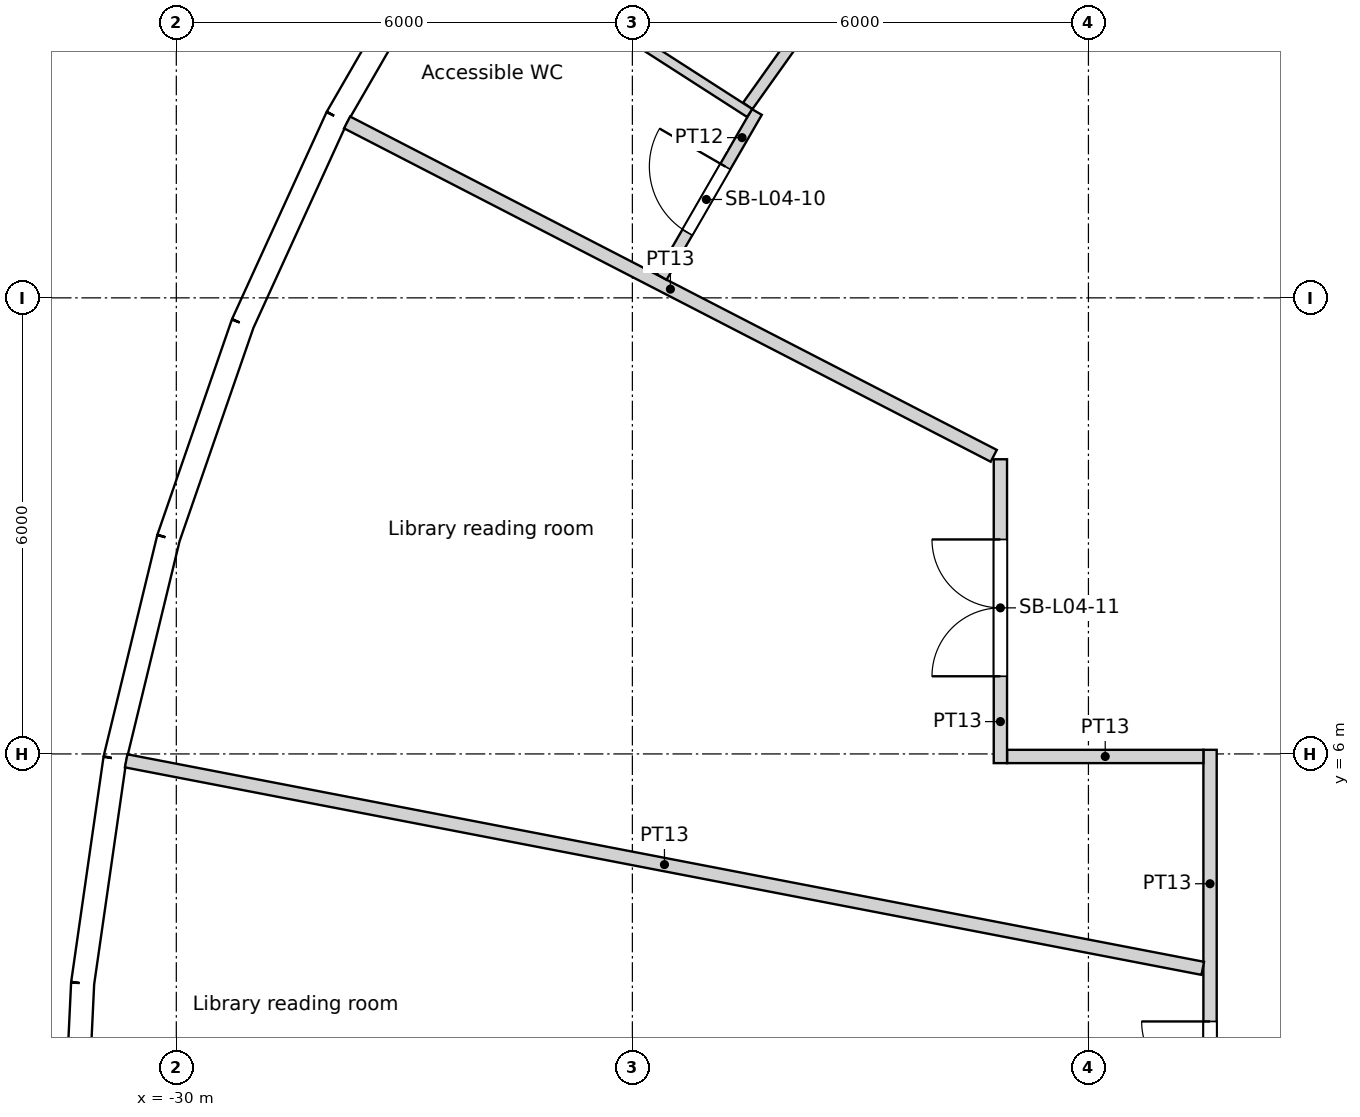
"""IFC4 building model, lengths in metres.
Left out: names, types, materials, properties, quantities, classifications, styles, units other than length and angle.
Written with IfcOpenShell. Run it as: python <this file> out.ifc"""

import sys

from ifc_helpers import new_model, si_unit, direction, frame, frame_2d, origin, origin_2d, place, context, subcontext, project, spatial, rectangle, circle, extrude, element, fill, save


model = new_model("IFC4")
c1 = context("Model", 3, precision=1e-05, world=origin(), true_north=direction((0.0, 1.0)))
c2 = subcontext(c1, "Body", "Model", "MODEL_VIEW")
j1 = project(units=[si_unit("LENGTHUNIT", "METRE"), si_unit("PLANEANGLEUNIT", "RADIAN")], contexts=[c1])
p1 = place(None, origin())
s1 = spatial("IfcSite", under=j1, at=p1, CompositionType="ELEMENT")
p2 = place(p1, origin())
s2 = spatial("IfcBuilding", under=s1, at=p2, CompositionType="ELEMENT")
p3 = place(p2, frame((0.0, 0.0, 23.4)))
s3 = spatial("IfcBuildingStorey", under=s2, at=p3, CompositionType="ELEMENT", Elevation=23.4)
for number, where, z_axis, x_axis in (
    (1, (-26.909, 13.873, 0.0), (0.0, 0.0, 1.0), (1.0, 0.0, 0.0)),
    (2, (-29.048, 8.529, 0.0), (0.0, 0.0, 1.0), (1.0, 0.0, 0.0)),
    (3, (-30.137, 2.878, 0.0), (0.0, 0.0, 1.0), (1.0, 0.0, 0.0)),
):
    element("IfcColumn", number, at=place(p3, frame(where, z_axis=z_axis, x_axis=x_axis)), inside=s3, PredefinedType="COLUMN", context=c2, shape_type="SweptSolid", body=[
        extrude(circle(Radius=0.7, at=origin_2d()), origin(), (0.0, 0.0, 1.0), 4.8),
    ])
for number, where, z_axis, x_axis in (
    (4, (-20.509, 13.489, 0.0), (0.0, 0.0, 1.0), (1.0, 0.0, 0.0)),
    (5, (-23.067, 8.396, 0.0), (0.0, 0.0, 1.0), (1.0, 0.0, 0.0)),
    (6, (-24.382, 2.85, 0.0), (0.0, 0.0, 1.0), (1.0, 0.0, 0.0)),
):
    element("IfcColumn", number, at=place(p3, frame(where, z_axis=z_axis, x_axis=x_axis)), inside=s3, PredefinedType="COLUMN", context=c2, shape_type="SweptSolid", body=[
        extrude(circle(Radius=0.75, at=origin_2d()), origin(), (0.0, 0.0, 1.0), 4.8),
    ])
for number, where, z_axis, x_axis in (
    (7, (-16.958, 8.167, 0.0), (0.0, 0.0, 1.0), (1.0, 0.0, 0.0)),
    (8, (-18.612, 2.805, 0.0), (0.0, 0.0, 1.0), (1.0, 0.0, 0.0)),
):
    element("IfcColumn", number, at=place(p3, frame(where, z_axis=z_axis, x_axis=x_axis)), inside=s3, PredefinedType="COLUMN", context=c2, shape_type="SweptSolid", body=[
        extrude(circle(Radius=0.8, at=origin_2d()), origin(), (0.0, 0.0, 1.0), 4.8),
    ])
p4 = place(p3, frame((-26.394, 16.962, 0.0), z_axis=(0.0, 0.0, 1.0), x_axis=(-0.500017373705, -0.866015372839, 0.0)))
e9 = element("IfcWall", 9, at=p4, inside=s3, PredefinedType="SOLIDWALL", context=c2, shape_type="SweptSolid", body=[
    extrude(rectangle(XDim=2.986, YDim=0.3, at=frame_2d((1.493, 0.0))), origin(), (0.0, 0.0, 1.0), 3.85),
])
p5 = place(p4, frame((1.493, 0.0, 2.0)))
e10 = element("IfcOpeningElement", 10, at=p5, cuts=e9, PredefinedType="OPENING", context=c2, shape_type="SweptSolid", body=[
    extrude(circle(Radius=1.2, at=origin_2d()), frame((0.0, 0.16, 0.0), z_axis=(0.0, -1.0, 0.0), x_axis=(1.0, 0.0, 0.0)), (0.0, 0.0, 1.0), 0.32),
])
p6 = place(p3, frame((-27.887, 14.377, 0.0), z_axis=(0.0, 0.0, 1.0), x_axis=(-0.415373250944, -0.909651066289, 0.0)))
e11 = element("IfcWall", 11, at=p6, inside=s3, PredefinedType="SOLIDWALL", context=c2, shape_type="SweptSolid", body=[
    extrude(rectangle(XDim=2.986, YDim=0.3, at=frame_2d((1.493, 0.0))), origin(), (0.0, 0.0, 1.0), 4.35),
])
p7 = place(p6, frame((1.493, 0.0, 2.0)))
e12 = element("IfcOpeningElement", 12, at=p7, cuts=e11, PredefinedType="OPENING", context=c2, shape_type="SweptSolid", body=[
    extrude(circle(Radius=1.2, at=origin_2d()), frame((0.0, 0.16, 0.0), z_axis=(0.0, -1.0, 0.0), x_axis=(1.0, 0.0, 0.0)), (0.0, 0.0, 1.0), 0.32),
])
p8 = place(p3, frame((-29.127, 11.661, 0.0), z_axis=(0.0, 0.0, 1.0), x_axis=(-0.327074054052, -0.944998710669, 0.0)))
e13 = element("IfcWall", 13, at=p8, inside=s3, PredefinedType="SOLIDWALL", context=c2, shape_type="SweptSolid", body=[
    extrude(rectangle(XDim=2.986, YDim=0.3, at=frame_2d((1.493, 0.0))), origin(), (0.0, 0.0, 1.0), 4.35),
])
p9 = place(p8, frame((1.493, 0.0, 2.0)))
e14 = element("IfcOpeningElement", 14, at=p9, cuts=e13, PredefinedType="OPENING", context=c2, shape_type="SweptSolid", body=[
    extrude(circle(Radius=1.2, at=origin_2d()), frame((0.0, 0.16, 0.0), z_axis=(0.0, -1.0, 0.0), x_axis=(1.0, 0.0, 0.0)), (0.0, 0.0, 1.0), 0.32),
])
p10 = place(p3, frame((-30.104, 8.839, 0.0), z_axis=(0.0, 0.0, 1.0), x_axis=(-0.235756834479, -0.971812078026, 0.0)))
e15 = element("IfcWall", 15, at=p10, inside=s3, PredefinedType="SOLIDWALL", context=c2, shape_type="SweptSolid", body=[
    extrude(rectangle(XDim=2.986, YDim=0.3, at=frame_2d((1.493, 0.0))), origin(), (0.0, 0.0, 1.0), 3.85),
])
p11 = place(p10, frame((1.493, 0.0, 2.0)))
e16 = element("IfcOpeningElement", 16, at=p11, cuts=e15, PredefinedType="OPENING", context=c2, shape_type="SweptSolid", body=[
    extrude(circle(Radius=1.2, at=origin_2d()), frame((0.0, 0.16, 0.0), z_axis=(0.0, -1.0, 0.0), x_axis=(1.0, 0.0, 0.0)), (0.0, 0.0, 1.0), 0.32),
])
p12 = place(p3, frame((-30.807, 5.938, 0.0), z_axis=(0.0, 0.0, 1.0), x_axis=(-0.142360001917, -0.989814947278, 0.0)))
e17 = element("IfcWall", 17, at=p12, inside=s3, PredefinedType="SOLIDWALL", context=c2, shape_type="SweptSolid", body=[
    extrude(rectangle(XDim=2.986, YDim=0.3, at=frame_2d((1.493, 0.0))), origin(), (0.0, 0.0, 1.0), 4.35),
])
p13 = place(p12, frame((1.493, 0.0, 2.0)))
e18 = element("IfcOpeningElement", 18, at=p13, cuts=e17, PredefinedType="OPENING", context=c2, shape_type="SweptSolid", body=[
    extrude(circle(Radius=1.2, at=origin_2d()), frame((0.0, 0.16, 0.0), z_axis=(0.0, -1.0, 0.0), x_axis=(1.0, 0.0, 0.0)), (0.0, 0.0, 1.0), 0.32),
])
p14 = place(p3, frame((-31.232, 2.982, 0.0), z_axis=(0.0, 0.0, 1.0), x_axis=(-0.047588458579, -0.998867027492, 0.0)))
e19 = element("IfcWall", 19, at=p14, inside=s3, PredefinedType="SOLIDWALL", context=c2, shape_type="SweptSolid", body=[
    extrude(rectangle(XDim=2.986, YDim=0.3, at=frame_2d((1.493, 0.0))), origin(), (0.0, 0.0, 1.0), 4.35),
])
p15 = place(p14, frame((1.493, 0.0, 2.0)))
e20 = element("IfcOpeningElement", 20, at=p15, cuts=e19, PredefinedType="OPENING", context=c2, shape_type="SweptSolid", body=[
    extrude(circle(Radius=1.2, at=origin_2d()), frame((0.0, 0.16, 0.0), z_axis=(0.0, -1.0, 0.0), x_axis=(1.0, 0.0, 0.0)), (0.0, 0.0, 1.0), 0.32),
])
p16 = place(p3, frame((-30.66, 5.909, 0.0), z_axis=(0.0, 0.0, 1.0), x_axis=(0.981927651436, -0.189256670545, 0.0)))
e21 = element("IfcWall", 21, at=p16, inside=s3, PredefinedType="PARTITIONING", context=c2, shape_type="SweptSolid", body=[
    extrude(rectangle(XDim=14.425, YDim=0.175, at=frame_2d((7.212, 0.0))), origin(), (0.0, 0.0, 1.0), 3.75),
])
p17 = place(p3, frame((-27.753, 14.308, 0.0), z_axis=(0.0, 0.0, 1.0), x_axis=(0.888834171956, -0.458228998169, 0.0)))
e22 = element("IfcWall", 22, at=p17, inside=s3, PredefinedType="PARTITIONING", context=c2, shape_type="SweptSolid", body=[
    extrude(rectangle(XDim=9.572, YDim=0.175, at=frame_2d((4.786, 0.0))), origin(), (0.0, 0.0, 1.0), 3.75),
])
p18 = place(p3, frame((-26.268, 16.881, 0.0), z_axis=(0.0, 0.0, 1.0), x_axis=(0.841252009565, -0.540643187697, 0.0)))
e23 = element("IfcWall", 23, at=p18, inside=s3, PredefinedType="PARTITIONING", context=c2, shape_type="SweptSolid", body=[
    extrude(rectangle(XDim=4.53, YDim=0.125, at=frame_2d((2.265, 0.0))), origin(), (0.0, 0.0, 1.0), 3.75),
])
p19 = place(p3, frame((-23.615, 12.275, 0.0), z_axis=(0.0, 0.0, 1.0), x_axis=(0.499952953824, 0.866052564203, 0.0)))
e24 = element("IfcWall", 24, at=p19, inside=s3, PredefinedType="PARTITIONING", context=c2, shape_type="SweptSolid", body=[
    extrude(rectangle(XDim=2.506, YDim=0.15, at=frame_2d((1.253, 0.0))), origin(), (0.0, 0.0, 1.0), 3.75),
])
p20 = place(p19, frame((0.677, 0.0, 0.0)))
e25 = element("IfcOpeningElement", 25, at=p20, cuts=e24, PredefinedType="OPENING", context=c2, shape_type="SweptSolid", body=[
    extrude(rectangle(XDim=1.0, YDim=2.1, at=frame_2d((0.5, 1.05))), frame((0.0, 0.075, 0.0), z_axis=(0.0, -1.0, 0.0), x_axis=(1.0, 0.0, 0.0)), (0.0, 0.0, 1.0), 0.15),
])
p21 = place(p3, frame((-21.042, 16.548, 0.0), z_axis=(0.0, 0.0, 1.0), x_axis=(-0.58007505892, -0.814563027653, 0.0)))
e26 = element("IfcWall", 26, at=p21, inside=s3, PredefinedType="PARTITIONING", context=c2, shape_type="SweptSolid", body=[
    extrude(rectangle(XDim=2.483, YDim=0.15, at=frame_2d((1.242, 0.0))), origin(), (0.0, 0.0, 1.0), 3.75),
])
p22 = place(p3, frame((-19.071, 5.967, 0.0), z_axis=(0.0, 0.0, 1.0), x_axis=(1.0, 0.0, 0.0)))
e27 = element("IfcWall", 27, at=p22, inside=s3, PredefinedType="PARTITIONING", context=c2, shape_type="SweptSolid", body=[
    extrude(rectangle(XDim=2.583, YDim=0.175, at=frame_2d((1.292, 0.0))), origin(), (0.0, 0.0, 1.0), 3.75),
])
p23 = place(p3, frame((-19.158, 5.879, 0.0), z_axis=(0.0, 0.0, 1.0), x_axis=(0.0, 1.0, 0.0)))
e28 = element("IfcWall", 28, at=p23, inside=s3, PredefinedType="PARTITIONING", context=c2, shape_type="SweptSolid", body=[
    extrude(rectangle(XDim=3.998, YDim=0.175, at=frame_2d((1.999, 0.0))), origin(), (0.0, 0.0, 1.0), 3.75),
])
p24 = place(p23, frame((1.143, 0.0, 0.0)))
e29 = element("IfcOpeningElement", 29, at=p24, cuts=e28, PredefinedType="OPENING", context=c2, shape_type="SweptSolid", body=[
    extrude(rectangle(XDim=1.8, YDim=2.4, at=frame_2d((0.9, 1.2))), frame((0.0, 0.087, 0.0), z_axis=(0.0, -1.0, 0.0), x_axis=(1.0, 0.0, 0.0)), (0.0, 0.0, 1.0), 0.175),
])
p25 = place(p3, frame((-16.4, -4.815, 0.0), z_axis=(0.0, 0.0, 1.0), x_axis=(0.0, 1.0, 0.0)))
e30 = element("IfcWall", 30, at=p25, inside=s3, PredefinedType="PARTITIONING", context=c2, shape_type="SweptSolid", body=[
    extrude(rectangle(XDim=10.87, YDim=0.175, at=frame_2d((5.435, 0.0))), origin(), (0.0, 0.0, 1.0), 3.75),
])
p26 = place(p25, frame((5.496, 0.0, 0.0)))
e31 = element("IfcOpeningElement", 31, at=p26, cuts=e30, PredefinedType="OPENING", context=c2, shape_type="SweptSolid", body=[
    extrude(rectangle(XDim=1.8, YDim=2.4, at=frame_2d((0.9, 1.2))), frame((0.0, 0.087, 0.0), z_axis=(0.0, -1.0, 0.0), x_axis=(1.0, 0.0, 0.0)), (0.0, 0.0, 1.0), 0.175),
])
p27 = place(p25, frame((1.508, 0.0, 0.0)))
e32 = element("IfcOpeningElement", 32, at=p27, cuts=e30, PredefinedType="OPENING", context=c2, shape_type="SweptSolid", body=[
    extrude(rectangle(XDim=1.8, YDim=2.4, at=frame_2d((0.9, 1.2))), frame((0.0, 0.087, 0.0), z_axis=(0.0, -1.0, 0.0), x_axis=(1.0, 0.0, 0.0)), (0.0, 0.0, 1.0), 0.175),
])
p28 = place(p5, origin())
e33 = element("IfcWindow", 33, at=p28, inside=s3, PartitioningType="SINGLE_PANEL", PredefinedType="WINDOW", context=c2, shape_type="SweptSolid", body=[
    extrude(circle(Radius=1.2, at=origin_2d()), frame((0.0, 0.12, 0.0), z_axis=(0.0, -1.0, 0.0), x_axis=(1.0, 0.0, 0.0)), (0.0, 0.0, 1.0), 0.1),
])
fill(e10, e33)
p29 = place(p7, origin())
e34 = element("IfcWindow", 34, at=p29, inside=s3, PartitioningType="SINGLE_PANEL", PredefinedType="WINDOW", context=c2, shape_type="SweptSolid", body=[
    extrude(circle(Radius=1.2, at=origin_2d()), frame((0.0, 0.12, 0.0), z_axis=(0.0, -1.0, 0.0), x_axis=(1.0, 0.0, 0.0)), (0.0, 0.0, 1.0), 0.1),
])
fill(e12, e34)
p30 = place(p9, origin())
e35 = element("IfcWindow", 35, at=p30, inside=s3, PartitioningType="SINGLE_PANEL", PredefinedType="WINDOW", context=c2, shape_type="SweptSolid", body=[
    extrude(circle(Radius=1.2, at=origin_2d()), frame((0.0, 0.12, 0.0), z_axis=(0.0, -1.0, 0.0), x_axis=(1.0, 0.0, 0.0)), (0.0, 0.0, 1.0), 0.1),
])
fill(e14, e35)
p31 = place(p11, origin())
e36 = element("IfcWindow", 36, at=p31, inside=s3, PartitioningType="SINGLE_PANEL", PredefinedType="WINDOW", context=c2, shape_type="SweptSolid", body=[
    extrude(circle(Radius=1.2, at=origin_2d()), frame((0.0, 0.12, 0.0), z_axis=(0.0, -1.0, 0.0), x_axis=(1.0, 0.0, 0.0)), (0.0, 0.0, 1.0), 0.1),
])
fill(e16, e36)
p32 = place(p13, origin())
e37 = element("IfcWindow", 37, at=p32, inside=s3, PartitioningType="SINGLE_PANEL", PredefinedType="WINDOW", context=c2, shape_type="SweptSolid", body=[
    extrude(circle(Radius=1.2, at=origin_2d()), frame((0.0, 0.12, 0.0), z_axis=(0.0, -1.0, 0.0), x_axis=(1.0, 0.0, 0.0)), (0.0, 0.0, 1.0), 0.1),
])
fill(e18, e37)
p33 = place(p15, origin())
e38 = element("IfcWindow", 38, at=p33, inside=s3, PartitioningType="SINGLE_PANEL", PredefinedType="WINDOW", context=c2, shape_type="SweptSolid", body=[
    extrude(circle(Radius=1.2, at=origin_2d()), frame((0.0, 0.12, 0.0), z_axis=(0.0, -1.0, 0.0), x_axis=(1.0, 0.0, 0.0)), (0.0, 0.0, 1.0), 0.1),
])
fill(e20, e38)
p34 = place(p20, origin())
e39 = element("IfcDoor", 39, at=p34, inside=s3, OperationType="SINGLE_SWING_RIGHT", PredefinedType="DOOR", context=c2, shape_type="SweptSolid", body=[
    extrude(rectangle(XDim=1.0, YDim=2.1, at=frame_2d((0.5, 1.05))), frame((0.0, 0.025, 0.0), z_axis=(0.0, -1.0, 0.0), x_axis=(1.0, 0.0, 0.0)), (0.0, 0.0, 1.0), 0.05),
])
fill(e25, e39)
p35 = place(p24, origin())
e40 = element("IfcDoor", 40, at=p35, inside=s3, OperationType="DOUBLE_DOOR_SINGLE_SWING", PredefinedType="DOOR", context=c2, shape_type="SweptSolid", body=[
    extrude(rectangle(XDim=1.8, YDim=2.4, at=frame_2d((0.9, 1.2))), frame((0.0, 0.025, 0.0), z_axis=(0.0, -1.0, 0.0), x_axis=(1.0, 0.0, 0.0)), (0.0, 0.0, 1.0), 0.05),
])
fill(e29, e40)
p36 = place(p26, origin())
e41 = element("IfcDoor", 41, at=p36, inside=s3, OperationType="DOUBLE_DOOR_SINGLE_SWING", PredefinedType="DOOR", context=c2, shape_type="SweptSolid", body=[
    extrude(rectangle(XDim=1.8, YDim=2.4, at=frame_2d((0.9, 1.2))), frame((0.0, 0.025, 0.0), z_axis=(0.0, -1.0, 0.0), x_axis=(1.0, 0.0, 0.0)), (0.0, 0.0, 1.0), 0.05),
])
fill(e31, e41)
save(model, sys.argv[1])
